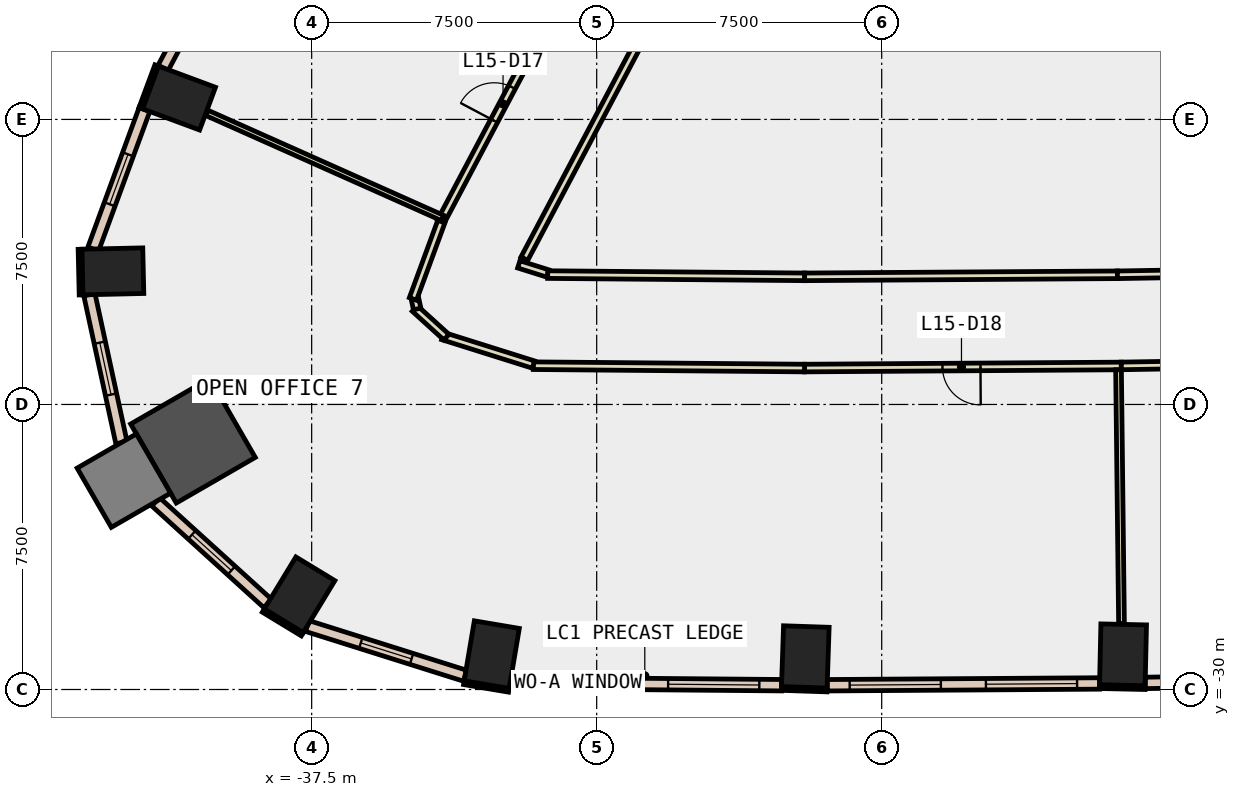
"""IFC4 building model, lengths in metres.
Left out: names, types, materials, properties, quantities, classifications, styles, units other than length and angle.
Written with IfcOpenShell. Run it as: python <this file> out.ifc"""

import sys

from ifc_helpers import new_model, si_unit, direction, frame, frame_2d, origin, origin_2d, place, context, subcontext, project, spatial, rectangle, extrude, element, fill, save


model = new_model("IFC4")
c1 = context("Model", 3, precision=1e-05, world=origin(), true_north=direction((0.0, 1.0)))
c2 = subcontext(c1, "Body", "Model", "MODEL_VIEW")
j1 = project(units=[si_unit("LENGTHUNIT", "METRE"), si_unit("PLANEANGLEUNIT", "RADIAN")], contexts=[c1])
p1 = place(None, origin())
s1 = spatial("IfcSite", under=j1, at=p1, CompositionType="ELEMENT")
p2 = place(p1, origin())
s2 = spatial("IfcBuilding", under=s1, at=p2, CompositionType="ELEMENT")
p3 = place(p2, frame((0.0, 0.0, 72.8)))
s3 = spatial("IfcBuildingStorey", under=s2, at=p3, CompositionType="ELEMENT", Elevation=72.8)
for number, where, z_axis, x_axis in (
    (1, (-32.761, -29.082, -0.4), (0.0, 0.0, 1.0), (-0.986, 0.167, 0.0)),
    (2, (-24.51, -29.143, -0.4), (0.0, 0.0, 1.0), (-0.999, 0.034, 0.0)),
    (3, (-16.15, -29.087, -0.4), (0.0, 0.0, 1.0), (-1.0, 0.022, 0.0)),
    (4, (-40.99, -14.438, -0.4), (0.0, 0.0, 1.0), (0.348, 0.937, 0.0)),
    (5, (-42.731, -18.998, -0.4), (0.0, 0.0, 1.0), (-0.023, 1.0, 0.0)),
):
    element("IfcColumn", number, at=place(p3, frame(where, z_axis=z_axis, x_axis=x_axis)), inside=s3, PredefinedType="COLUMN", context=c2, shape_type="SweptSolid", body=[
        extrude(rectangle(XDim=1.2, YDim=1.6, at=origin_2d()), origin(), (0.0, 0.0, 1.0), 4.2),
    ])
p4 = place(p3, frame((-40.623, -23.454, -0.4), z_axis=(0.0, 0.0, 1.0), x_axis=(0.866025403784, 0.5, 0.0)))
e6 = element("IfcColumn", 6, at=p4, inside=s3, PredefinedType="COLUMN", context=c2, shape_type="SweptSolid", body=[
    extrude(rectangle(XDim=2.4, YDim=2.4, at=origin_2d()), origin(), (0.0, 0.0, 1.0), 4.2),
])
p5 = place(p3, frame((-37.818, -27.508, -0.4), z_axis=(0.0, 0.0, 1.0), x_axis=(-0.854522294989, 0.519414716163, 0.0)))
e7 = element("IfcColumn", 7, at=p5, inside=s3, PredefinedType="COLUMN", context=c2, shape_type="SweptSolid", body=[
    extrude(rectangle(XDim=1.2, YDim=1.6, at=origin_2d()), origin(), (0.0, 0.0, 1.0), 4.2),
])
p6 = place(p3, frame((-42.442, -24.504, -0.4), z_axis=(0.0, 0.0, 1.0), x_axis=(0.866025403784, 0.5, 0.0)))
e8 = element("IfcColumn", 8, at=p6, inside=s3, PredefinedType="COLUMN", context=c2, shape_type="SweptSolid", body=[
    extrude(rectangle(XDim=1.8, YDim=1.8, at=origin_2d()), origin(), (0.0, 0.0, 1.0), 4.2),
])
p7 = place(p3, frame((-41.578, -13.58, 0.0), z_axis=(0.0, 0.0, 1.0), x_axis=(-0.348446984414, -0.937328490473, 0.0)))
e9 = element("IfcWall", 9, at=p7, inside=s3, PredefinedType="STANDARD", context=c2, shape_type="SweptSolid", body=[
    extrude(rectangle(XDim=1.2, YDim=0.1, at=frame_2d((0.6, 0.0))), origin(), (0.0, 0.0, 1.0), 3.8),
])
for number, where, z_axis, x_axis in (
    (10, (-33.494, -29.82, 0.0), (0.0, 0.0, 1.0), (0.986, -0.167, 0.0)),
    (11, (-25.138, -29.972, 0.0), (0.0, 0.0, 1.0), (0.999, -0.033, 0.0)),
):
    element("IfcWall", number, at=place(p3, frame(where, z_axis=z_axis, x_axis=x_axis)), inside=s3, PredefinedType="STANDARD", context=c2, shape_type="SweptSolid", body=[
        extrude(rectangle(XDim=1.2, YDim=0.1, at=frame_2d((0.6, 0.0))), origin(), (0.0, 0.0, 1.0), 3.8),
    ])
for number, where, z_axis, x_axis in (
    (12, (-16.769, -29.924, 0.0), (0.0, 0.0, 1.0), (1.0, -0.022, 0.0)),
    (13, (-43.595, -18.417, 0.0), (0.0, 0.0, 1.0), (0.023, -1.0, 0.0)),
    (14, (-38.772, -27.923, 0.0), (0.0, 0.0, 1.0), (0.855, -0.519, 0.0)),
):
    element("IfcWall", number, at=place(p3, frame(where, z_axis=z_axis, x_axis=x_axis)), inside=s3, PredefinedType="STANDARD", context=c2, shape_type="SweptSolid", body=[
        extrude(rectangle(XDim=1.2, YDim=0.1, at=frame_2d((0.6, 0.0))), origin(), (0.0, 0.0, 1.0), 3.8),
    ])
p8 = place(p3, frame((-32.279, -29.825, 0.0), z_axis=(0.0, 0.0, 1.0), x_axis=(0.999962339493, -0.008678686333, 0.0)))
e15 = element("IfcWall", 15, at=p8, inside=s3, PredefinedType="STANDARD", context=c2, shape_type="SweptSolid", body=[
    extrude(rectangle(XDim=7.145, YDim=0.3, at=frame_2d((3.573, 0.0))), origin(), (0.0, 0.0, 1.0), 3.8),
])
p9 = place(p8, frame((0.586, 0.0, 0.9)))
e16 = element("IfcOpeningElement", 16, at=p9, cuts=e15, PredefinedType="OPENING", context=c2, shape_type="SweptSolid", body=[
    extrude(rectangle(XDim=2.4, YDim=2.6, at=frame_2d((1.2, 1.3))), frame((0.0, 0.16, 0.0), z_axis=(0.0, -1.0, 0.0), x_axis=(1.0, 0.0, 0.0)), (0.0, 0.0, 1.0), 0.32),
])
p10 = place(p8, frame((4.159, 0.0, 0.9)))
e17 = element("IfcOpeningElement", 17, at=p10, cuts=e15, PredefinedType="OPENING", context=c2, shape_type="SweptSolid", body=[
    extrude(rectangle(XDim=2.4, YDim=2.6, at=frame_2d((1.2, 1.3))), frame((0.0, 0.16, 0.0), z_axis=(0.0, -1.0, 0.0), x_axis=(1.0, 0.0, 0.0)), (0.0, 0.0, 1.0), 0.32),
])
p11 = place(p3, frame((-23.935, -29.888, 0.0), z_axis=(0.0, 0.0, 1.0), x_axis=(0.999978623918, 0.006538478947, 0.0)))
e18 = element("IfcWall", 18, at=p11, inside=s3, PredefinedType="STANDARD", context=c2, shape_type="SweptSolid", body=[
    extrude(rectangle(XDim=7.169, YDim=0.3, at=frame_2d((3.584, 0.0))), origin(), (0.0, 0.0, 1.0), 3.8),
])
p12 = place(p11, frame((0.592, 0.0, 0.9)))
e19 = element("IfcOpeningElement", 19, at=p12, cuts=e18, PredefinedType="OPENING", context=c2, shape_type="SweptSolid", body=[
    extrude(rectangle(XDim=2.4, YDim=2.6, at=frame_2d((1.2, 1.3))), frame((0.0, 0.16, 0.0), z_axis=(0.0, -1.0, 0.0), x_axis=(1.0, 0.0, 0.0)), (0.0, 0.0, 1.0), 0.32),
])
p13 = place(p11, frame((4.177, 0.0, 0.9)))
e20 = element("IfcOpeningElement", 20, at=p13, cuts=e18, PredefinedType="OPENING", context=c2, shape_type="SweptSolid", body=[
    extrude(rectangle(XDim=2.4, YDim=2.6, at=frame_2d((1.2, 1.3))), frame((0.0, 0.16, 0.0), z_axis=(0.0, -1.0, 0.0), x_axis=(1.0, 0.0, 0.0)), (0.0, 0.0, 1.0), 0.32),
])
p14 = place(p3, frame((-15.567, -29.827, 0.0), z_axis=(0.0, 0.0, 1.0), x_axis=(0.999857944706, 0.0168549817, 0.0)))
e21 = element("IfcWall", 21, at=p14, inside=s3, PredefinedType="STANDARD", context=c2, shape_type="SweptSolid", body=[
    extrude(rectangle(XDim=7.17, YDim=0.3, at=frame_2d((3.585, 0.0))), origin(), (0.0, 0.0, 1.0), 3.8),
])
p15 = place(p14, frame((0.593, 0.0, 0.9)))
e22 = element("IfcOpeningElement", 22, at=p15, cuts=e21, PredefinedType="OPENING", context=c2, shape_type="SweptSolid", body=[
    extrude(rectangle(XDim=2.4, YDim=2.6, at=frame_2d((1.2, 1.3))), frame((0.0, 0.16, 0.0), z_axis=(0.0, -1.0, 0.0), x_axis=(1.0, 0.0, 0.0)), (0.0, 0.0, 1.0), 0.32),
])
p16 = place(p14, frame((4.178, 0.0, 0.9)))
e23 = element("IfcOpeningElement", 23, at=p16, cuts=e21, PredefinedType="OPENING", context=c2, shape_type="SweptSolid", body=[
    extrude(rectangle(XDim=2.4, YDim=2.6, at=frame_2d((1.2, 1.3))), frame((0.0, 0.16, 0.0), z_axis=(0.0, -1.0, 0.0), x_axis=(1.0, 0.0, 0.0)), (0.0, 0.0, 1.0), 0.32),
])
p17 = place(p3, frame((-38.469, -8.092, 0.0), z_axis=(0.0, 0.0, 1.0), x_axis=(-0.467968066899, -0.883745375299, 0.0)))
e24 = element("IfcWall", 24, at=p17, inside=s3, PredefinedType="STANDARD", context=c2, shape_type="SweptSolid", body=[
    extrude(rectangle(XDim=6.282, YDim=0.3, at=frame_2d((3.141, 0.0))), origin(), (0.0, 0.0, 1.0), 3.8),
])
p18 = place(p17, frame((0.571, 0.0, 0.9)))
e25 = element("IfcOpeningElement", 25, at=p18, cuts=e24, PredefinedType="OPENING", context=c2, shape_type="SweptSolid", body=[
    extrude(rectangle(XDim=2.0, YDim=2.6, at=frame_2d((1.0, 1.3))), frame((0.0, 0.16, 0.0), z_axis=(0.0, -1.0, 0.0), x_axis=(1.0, 0.0, 0.0)), (0.0, 0.0, 1.0), 0.32),
])
p19 = place(p17, frame((3.712, 0.0, 0.9)))
e26 = element("IfcOpeningElement", 26, at=p19, cuts=e24, PredefinedType="OPENING", context=c2, shape_type="SweptSolid", body=[
    extrude(rectangle(XDim=2.0, YDim=2.6, at=frame_2d((1.0, 1.3))), frame((0.0, 0.16, 0.0), z_axis=(0.0, -1.0, 0.0), x_axis=(1.0, 0.0, 0.0)), (0.0, 0.0, 1.0), 0.32),
])
p20 = place(p3, frame((-41.9, -14.74, 0.0), z_axis=(0.0, 0.0, 1.0), x_axis=(-0.344819708397, -0.938668934556, 0.0)))
e27 = element("IfcWall", 27, at=p20, inside=s3, PredefinedType="STANDARD", context=c2, shape_type="SweptSolid", body=[
    extrude(rectangle(XDim=3.91, YDim=0.3, at=frame_2d((1.955, 0.0))), origin(), (0.0, 0.0, 1.0), 3.8),
])
p21 = place(p20, frame((1.255, 0.0, 0.9)))
e28 = element("IfcOpeningElement", 28, at=p21, cuts=e27, PredefinedType="OPENING", context=c2, shape_type="SweptSolid", body=[
    extrude(rectangle(XDim=1.4, YDim=2.6, at=frame_2d((0.7, 1.3))), frame((0.0, 0.16, 0.0), z_axis=(0.0, -1.0, 0.0), x_axis=(1.0, 0.0, 0.0)), (0.0, 0.0, 1.0), 0.32),
])
p22 = place(p3, frame((-43.349, -19.611, 0.0), z_axis=(0.0, 0.0, 1.0), x_axis=(0.211701618364, -0.977334346466, 0.0)))
e29 = element("IfcWall", 29, at=p22, inside=s3, PredefinedType="STANDARD", context=c2, shape_type="SweptSolid", body=[
    extrude(rectangle(XDim=3.982, YDim=0.3, at=frame_2d((1.991, 0.0))), origin(), (0.0, 0.0, 1.0), 3.8),
])
p23 = place(p22, frame((1.291, 0.0, 0.9)))
e30 = element("IfcOpeningElement", 30, at=p23, cuts=e29, PredefinedType="OPENING", context=c2, shape_type="SweptSolid", body=[
    extrude(rectangle(XDim=1.4, YDim=2.6, at=frame_2d((0.7, 1.3))), frame((0.0, 0.16, 0.0), z_axis=(0.0, -1.0, 0.0), x_axis=(1.0, 0.0, 0.0)), (0.0, 0.0, 1.0), 0.32),
])
p24 = place(p3, frame((-41.606, -25.06, 0.0), z_axis=(0.0, 0.0, 1.0), x_axis=(0.740547309915, -0.6720042275, 0.0)))
e31 = element("IfcWall", 31, at=p24, inside=s3, PredefinedType="STANDARD", context=c2, shape_type="SweptSolid", body=[
    extrude(rectangle(XDim=3.982, YDim=0.3, at=frame_2d((1.991, 0.0))), origin(), (0.0, 0.0, 1.0), 3.8),
])
p25 = place(p24, frame((1.291, 0.0, 0.9)))
e32 = element("IfcOpeningElement", 32, at=p25, cuts=e31, PredefinedType="OPENING", context=c2, shape_type="SweptSolid", body=[
    extrude(rectangle(XDim=1.4, YDim=2.6, at=frame_2d((0.7, 1.3))), frame((0.0, 0.16, 0.0), z_axis=(0.0, -1.0, 0.0), x_axis=(1.0, 0.0, 0.0)), (0.0, 0.0, 1.0), 0.32),
])
p26 = place(p3, frame((-37.616, -28.33, 0.0), z_axis=(0.0, 0.0, 1.0), x_axis=(0.953822182375, -0.300371843571, 0.0)))
e33 = element("IfcWall", 33, at=p26, inside=s3, PredefinedType="STANDARD", context=c2, shape_type="SweptSolid", body=[
    extrude(rectangle(XDim=4.354, YDim=0.3, at=frame_2d((2.177, 0.0))), origin(), (0.0, 0.0, 1.0), 3.8),
])
p27 = place(p26, frame((1.477, 0.0, 0.9)))
e34 = element("IfcOpeningElement", 34, at=p27, cuts=e33, PredefinedType="OPENING", context=c2, shape_type="SweptSolid", body=[
    extrude(rectangle(XDim=1.4, YDim=2.6, at=frame_2d((0.7, 1.3))), frame((0.0, 0.16, 0.0), z_axis=(0.0, -1.0, 0.0), x_axis=(1.0, 0.0, 0.0)), (0.0, 0.0, 1.0), 0.32),
])
p28 = place(p3, frame((-28.712, -12.638, 0.0), z_axis=(0.0, 0.0, 1.0), x_axis=(-0.46804565502, -0.883704285843, 0.0)))
e35 = element("IfcWall", 35, at=p28, inside=s3, PredefinedType="PARTITIONING", context=c2, shape_type="SweptSolid", body=[
    extrude(rectangle(XDim=6.818, YDim=0.2, at=frame_2d((3.409, 0.0))), origin(), (0.0, 0.0, 1.0), 3.8),
])
p29 = place(p3, frame((-32.05, -18.813, 0.0), z_axis=(0.0, 0.0, 1.0), x_axis=(0.953816959026, -0.300388429661, 0.0)))
e36 = element("IfcWall", 36, at=p29, inside=s3, PredefinedType="PARTITIONING", context=c2, shape_type="SweptSolid", body=[
    extrude(rectangle(XDim=0.802, YDim=0.2, at=frame_2d((0.401, 0.0))), origin(), (0.0, 0.0, 1.0), 3.8),
])
p30 = place(p3, frame((-31.289, -19.083, 0.0), z_axis=(0.0, 0.0, 1.0), x_axis=(0.999961820006, -0.00873833678, 0.0)))
e37 = element("IfcWall", 37, at=p30, inside=s3, PredefinedType="PARTITIONING", context=c2, shape_type="SweptSolid", body=[
    extrude(rectangle(XDim=6.761, YDim=0.2, at=frame_2d((3.381, 0.0))), origin(), (0.0, 0.0, 1.0), 3.8),
])
p31 = place(p3, frame((-24.528, -19.142, 0.0), z_axis=(0.0, 0.0, 1.0), x_axis=(0.999978315754, 0.00658544011, 0.0)))
e38 = element("IfcWall", 38, at=p31, inside=s3, PredefinedType="PARTITIONING", context=c2, shape_type="SweptSolid", body=[
    extrude(rectangle(XDim=8.23, YDim=0.2, at=frame_2d((4.115, 0.0))), origin(), (0.0, 0.0, 1.0), 3.8),
])
p32 = place(p3, frame((-16.298, -19.088, 0.0), z_axis=(0.0, 0.0, 1.0), x_axis=(0.999857252997, 0.016895964865, 0.0)))
e39 = element("IfcWall", 39, at=p32, inside=s3, PredefinedType="PARTITIONING", context=c2, shape_type="SweptSolid", body=[
    extrude(rectangle(XDim=8.395, YDim=0.2, at=frame_2d((4.198, 0.0))), origin(), (0.0, 0.0, 1.0), 3.8),
])
p33 = place(p32, frame((3.298, 0.0, 0.0)))
e40 = element("IfcOpeningElement", 40, at=p33, cuts=e39, PredefinedType="OPENING", context=c2, shape_type="SweptSolid", body=[
    extrude(rectangle(XDim=1.8, YDim=2.1, at=frame_2d((0.9, 1.05))), frame((0.0, 0.11, 0.0), z_axis=(0.0, -1.0, 0.0), x_axis=(1.0, 0.0, 0.0)), (0.0, 0.0, 1.0), 0.22),
])
p34 = place(p3, frame((-34.1, -17.683, 0.0), z_axis=(0.0, 0.0, 1.0), x_axis=(0.468043346631, 0.883705508456, 0.0)))
e41 = element("IfcWall", 41, at=p34, inside=s3, PredefinedType="PARTITIONING", context=c2, shape_type="SweptSolid", body=[
    extrude(rectangle(XDim=6.991, YDim=0.2, at=frame_2d((3.496, 0.0))), origin(), (0.0, 0.0, 1.0), 3.8),
])
p35 = place(p34, frame((2.996, 0.0, 0.0)))
e42 = element("IfcOpeningElement", 42, at=p35, cuts=e41, PredefinedType="OPENING", context=c2, shape_type="SweptSolid", body=[
    extrude(rectangle(XDim=1.0, YDim=2.1, at=frame_2d((0.5, 1.05))), frame((0.0, 0.11, 0.0), z_axis=(0.0, -1.0, 0.0), x_axis=(1.0, 0.0, 0.0)), (0.0, 0.0, 1.0), 0.22),
])
p36 = place(p3, frame((-16.195, -21.487, 0.0), z_axis=(0.0, 0.0, 1.0), x_axis=(-0.999978288386, -0.006589594508, 0.0)))
e43 = element("IfcWall", 43, at=p36, inside=s3, PredefinedType="PARTITIONING", context=c2, shape_type="SweptSolid", body=[
    extrude(rectangle(XDim=8.336, YDim=0.2, at=frame_2d((4.168, 0.0))), origin(), (0.0, 0.0, 1.0), 3.8),
])
p37 = place(p36, frame((3.706, 0.0, 0.0)))
e44 = element("IfcOpeningElement", 44, at=p37, cuts=e43, PredefinedType="OPENING", context=c2, shape_type="SweptSolid", body=[
    extrude(rectangle(XDim=1.0, YDim=2.1, at=frame_2d((0.5, 1.05))), frame((0.0, 0.11, 0.0), z_axis=(0.0, -1.0, 0.0), x_axis=(1.0, 0.0, 0.0)), (0.0, 0.0, 1.0), 0.22),
])
p38 = place(p3, frame((-24.531, -21.542, 0.0), z_axis=(0.0, 0.0, 1.0), x_axis=(-0.999962254422, 0.008688482627, 0.0)))
e45 = element("IfcWall", 45, at=p38, inside=s3, PredefinedType="PARTITIONING", context=c2, shape_type="SweptSolid", body=[
    extrude(rectangle(XDim=7.137, YDim=0.2, at=frame_2d((3.569, 0.0))), origin(), (0.0, 0.0, 1.0), 3.8),
])
p39 = place(p3, frame((-31.664, -21.45, 0.0), z_axis=(0.0, 0.0, 1.0), x_axis=(-0.953945024313, 0.299981483743, 0.0)))
e46 = element("IfcWall", 46, at=p39, inside=s3, PredefinedType="PARTITIONING", context=c2, shape_type="SweptSolid", body=[
    extrude(rectangle(XDim=2.5, YDim=0.2, at=frame_2d((1.25, 0.0))), origin(), (0.0, 0.0, 1.0), 3.8),
])
p40 = place(p3, frame((-33.954, -20.729, 0.0), z_axis=(0.0, 0.0, 1.0), x_axis=(-0.740510227228, 0.672045090281, 0.0)))
e47 = element("IfcWall", 47, at=p40, inside=s3, PredefinedType="PARTITIONING", context=c2, shape_type="SweptSolid", body=[
    extrude(rectangle(XDim=1.123, YDim=0.2, at=frame_2d((0.562, 0.0))), origin(), (0.0, 0.0, 1.0), 3.8),
])
p41 = place(p3, frame((-34.724, -19.987, 0.0), z_axis=(0.0, 0.0, 1.0), x_axis=(-0.210230703369, 0.977651804765, 0.0)))
e48 = element("IfcWall", 48, at=p41, inside=s3, PredefinedType="PARTITIONING", context=c2, shape_type="SweptSolid", body=[
    extrude(rectangle(XDim=0.309, YDim=0.2, at=frame_2d((0.154, 0.0))), origin(), (0.0, 0.0, 1.0), 3.8),
])
p42 = place(p3, frame((-34.835, -19.724, 0.0), z_axis=(0.0, 0.0, 1.0), x_axis=(0.34459875492, 0.938750072228, 0.0)))
e49 = element("IfcWall", 49, at=p42, inside=s3, PredefinedType="PARTITIONING", context=c2, shape_type="SweptSolid", body=[
    extrude(rectangle(XDim=2.168, YDim=0.2, at=frame_2d((1.084, 0.0))), origin(), (0.0, 0.0, 1.0), 3.8),
])
p43 = place(p3, frame((-7.881, -21.346, 0.0), z_axis=(0.0, 0.0, 1.0), x_axis=(-0.999857974935, -0.016853188395, 0.0)))
e50 = element("IfcWall", 50, at=p43, inside=s3, PredefinedType="PARTITIONING", context=c2, shape_type="SweptSolid", body=[
    extrude(rectangle(XDim=8.315, YDim=0.2, at=frame_2d((4.158, 0.0))), origin(), (0.0, 0.0, 1.0), 3.8),
])
p44 = place(p43, frame((3.732, 0.0, 0.0)))
e51 = element("IfcOpeningElement", 51, at=p44, cuts=e50, PredefinedType="OPENING", context=c2, shape_type="SweptSolid", body=[
    extrude(rectangle(XDim=1.0, YDim=2.1, at=frame_2d((0.5, 1.05))), frame((0.0, 0.11, 0.0), z_axis=(0.0, -1.0, 0.0), x_axis=(1.0, 0.0, 0.0)), (0.0, 0.0, 1.0), 0.22),
])
p45 = place(p3, frame((-34.053, -17.595, 0.0), z_axis=(0.0, 0.0, 1.0), x_axis=(-0.913298274621, 0.40729137184, 0.0)))
e52 = element("IfcWall", 52, at=p45, inside=s3, PredefinedType="PARTITIONING", context=c2, shape_type="SweptSolid", body=[
    extrude(rectangle(XDim=6.796, YDim=0.15, at=frame_2d((3.398, 0.0))), origin(), (0.0, 0.0, 1.0), 3.8),
])
p46 = place(p3, frame((-16.268, -21.587, 0.0), z_axis=(0.0, 0.0, 1.0), x_axis=(0.0116959614, -0.999931599904, 0.0)))
e53 = element("IfcWall", 53, at=p46, inside=s3, PredefinedType="PARTITIONING", context=c2, shape_type="SweptSolid", body=[
    extrude(rectangle(XDim=6.68, YDim=0.15, at=frame_2d((3.34, 0.0))), origin(), (0.0, 0.0, 1.0), 3.8),
])
p47 = place(p9, origin())
e54 = element("IfcWindow", 54, at=p47, inside=s3, PartitioningType="SINGLE_PANEL", PredefinedType="WINDOW", context=c2, shape_type="SweptSolid", body=[
    extrude(rectangle(XDim=2.4, YDim=2.6, at=frame_2d((1.2, 1.3))), frame((0.0, 0.03, 0.0), z_axis=(0.0, -1.0, 0.0), x_axis=(1.0, 0.0, 0.0)), (0.0, 0.0, 1.0), 0.06),
])
fill(e16, e54)
p48 = place(p10, origin())
e55 = element("IfcWindow", 55, at=p48, inside=s3, PartitioningType="SINGLE_PANEL", PredefinedType="WINDOW", context=c2, shape_type="SweptSolid", body=[
    extrude(rectangle(XDim=2.4, YDim=2.6, at=frame_2d((1.2, 1.3))), frame((0.0, 0.03, 0.0), z_axis=(0.0, -1.0, 0.0), x_axis=(1.0, 0.0, 0.0)), (0.0, 0.0, 1.0), 0.06),
])
fill(e17, e55)
p49 = place(p12, origin())
e56 = element("IfcWindow", 56, at=p49, inside=s3, PartitioningType="SINGLE_PANEL", PredefinedType="WINDOW", context=c2, shape_type="SweptSolid", body=[
    extrude(rectangle(XDim=2.4, YDim=2.6, at=frame_2d((1.2, 1.3))), frame((0.0, 0.03, 0.0), z_axis=(0.0, -1.0, 0.0), x_axis=(1.0, 0.0, 0.0)), (0.0, 0.0, 1.0), 0.06),
])
fill(e19, e56)
p50 = place(p13, origin())
e57 = element("IfcWindow", 57, at=p50, inside=s3, PartitioningType="SINGLE_PANEL", PredefinedType="WINDOW", context=c2, shape_type="SweptSolid", body=[
    extrude(rectangle(XDim=2.4, YDim=2.6, at=frame_2d((1.2, 1.3))), frame((0.0, 0.03, 0.0), z_axis=(0.0, -1.0, 0.0), x_axis=(1.0, 0.0, 0.0)), (0.0, 0.0, 1.0), 0.06),
])
fill(e20, e57)
p51 = place(p21, origin())
e58 = element("IfcWindow", 58, at=p51, inside=s3, PartitioningType="SINGLE_PANEL", PredefinedType="WINDOW", context=c2, shape_type="SweptSolid", body=[
    extrude(rectangle(XDim=1.4, YDim=2.6, at=frame_2d((0.7, 1.3))), frame((0.0, 0.03, 0.0), z_axis=(0.0, -1.0, 0.0), x_axis=(1.0, 0.0, 0.0)), (0.0, 0.0, 1.0), 0.06),
])
fill(e28, e58)
p52 = place(p23, origin())
e59 = element("IfcWindow", 59, at=p52, inside=s3, PartitioningType="SINGLE_PANEL", PredefinedType="WINDOW", context=c2, shape_type="SweptSolid", body=[
    extrude(rectangle(XDim=1.4, YDim=2.6, at=frame_2d((0.7, 1.3))), frame((0.0, 0.03, 0.0), z_axis=(0.0, -1.0, 0.0), x_axis=(1.0, 0.0, 0.0)), (0.0, 0.0, 1.0), 0.06),
])
fill(e30, e59)
p53 = place(p25, origin())
e60 = element("IfcWindow", 60, at=p53, inside=s3, PartitioningType="SINGLE_PANEL", PredefinedType="WINDOW", context=c2, shape_type="SweptSolid", body=[
    extrude(rectangle(XDim=1.4, YDim=2.6, at=frame_2d((0.7, 1.3))), frame((0.0, 0.03, 0.0), z_axis=(0.0, -1.0, 0.0), x_axis=(1.0, 0.0, 0.0)), (0.0, 0.0, 1.0), 0.06),
])
fill(e32, e60)
p54 = place(p27, origin())
e61 = element("IfcWindow", 61, at=p54, inside=s3, PartitioningType="SINGLE_PANEL", PredefinedType="WINDOW", context=c2, shape_type="SweptSolid", body=[
    extrude(rectangle(XDim=1.4, YDim=2.6, at=frame_2d((0.7, 1.3))), frame((0.0, 0.03, 0.0), z_axis=(0.0, -1.0, 0.0), x_axis=(1.0, 0.0, 0.0)), (0.0, 0.0, 1.0), 0.06),
])
fill(e34, e61)
p55 = place(p35, origin())
e62 = element("IfcDoor", 62, at=p55, inside=s3, OperationType="SINGLE_SWING_LEFT", PredefinedType="DOOR", context=c2, shape_type="SweptSolid", body=[
    extrude(rectangle(XDim=1.0, YDim=2.1, at=frame_2d((0.5, 1.05))), frame((0.0, 0.025, 0.0), z_axis=(0.0, -1.0, 0.0), x_axis=(1.0, 0.0, 0.0)), (0.0, 0.0, 1.0), 0.05),
])
fill(e42, e62)
p56 = place(p37, origin())
e63 = element("IfcDoor", 63, at=p56, inside=s3, OperationType="SINGLE_SWING_RIGHT", PredefinedType="DOOR", context=c2, shape_type="SweptSolid", body=[
    extrude(rectangle(XDim=1.0, YDim=2.1, at=frame_2d((0.5, 1.05))), frame((0.0, 0.025, 0.0), z_axis=(0.0, -1.0, 0.0), x_axis=(1.0, 0.0, 0.0)), (0.0, 0.0, 1.0), 0.05),
])
fill(e44, e63)
save(model, sys.argv[1])
